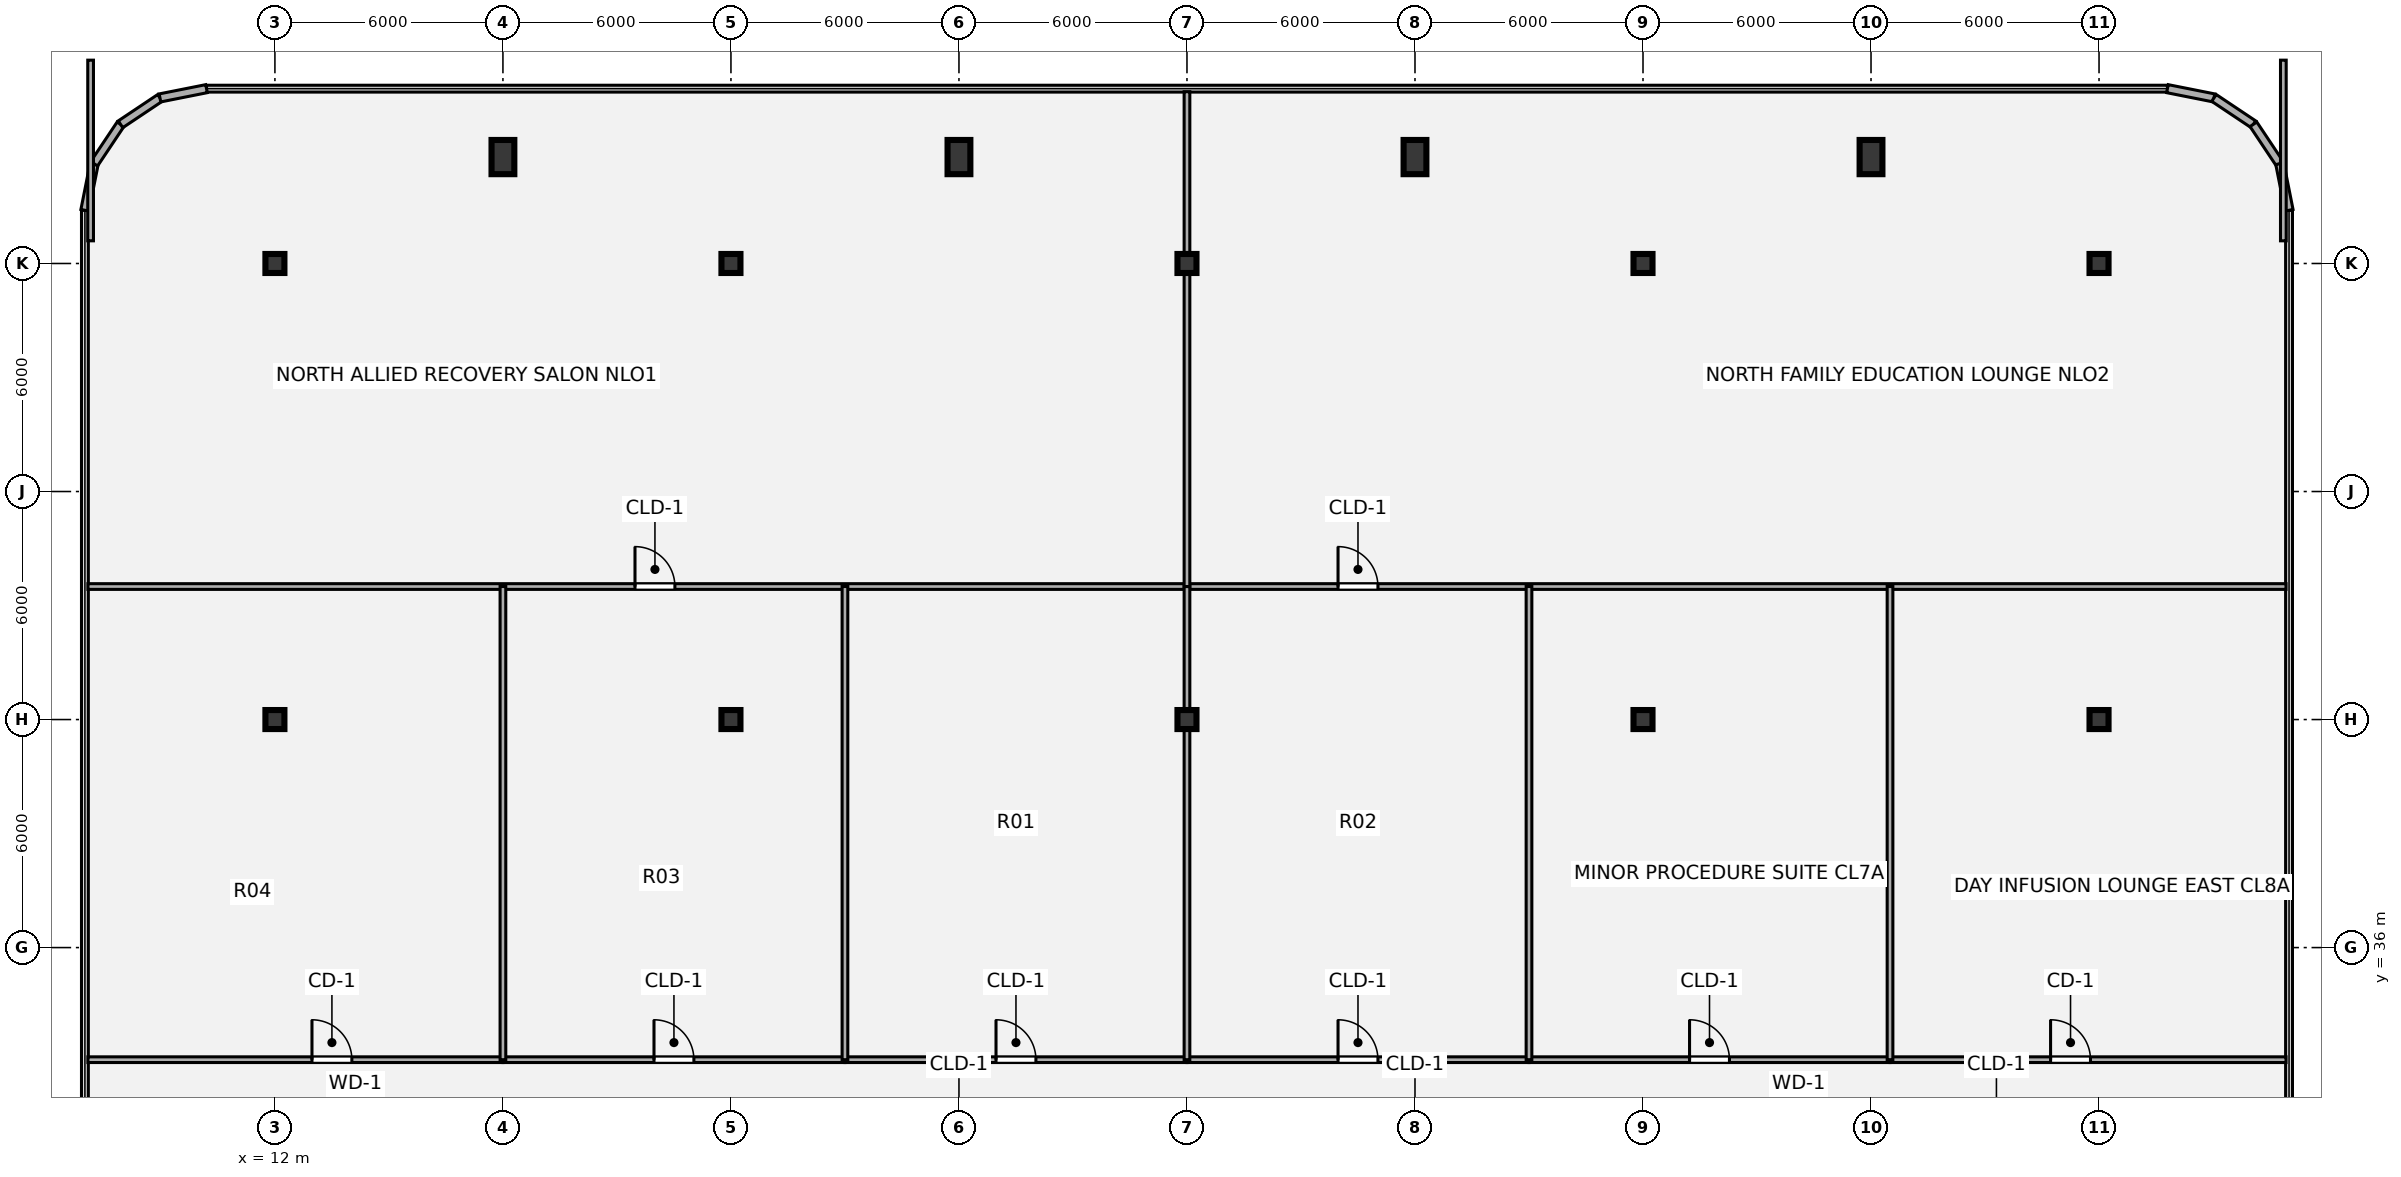
"""IFC4 building model, lengths in metres.
Left out: names, types, materials, properties, quantities, classifications, styles, units other than length and angle.
Written with IfcOpenShell. Run it as: python <this file> out.ifc"""

import sys

from ifc_helpers import new_model, si_unit, direction, frame, frame_2d, origin, origin_2d, place, context, subcontext, project, spatial, rectangle, i_section, extrude, source, transform, mapped, element, fill, save


model = new_model("IFC4")
c1 = context("Model", 3, precision=1e-05, world=origin(), true_north=direction((0.0, 1.0)))
c2 = subcontext(c1, "Body", "Model", "MODEL_VIEW")
j1 = project(units=[si_unit("LENGTHUNIT", "METRE"), si_unit("PLANEANGLEUNIT", "RADIAN")], contexts=[c1])
p1 = place(None, origin())
s1 = spatial("IfcSite", under=j1, at=p1, CompositionType="ELEMENT")
p2 = place(p1, origin())
s2 = spatial("IfcBuilding", under=s1, at=p2, CompositionType="ELEMENT")
p3 = place(p2, frame((0.0, 0.0, 9.72)))
s3 = spatial("IfcBuildingStorey", under=s2, at=p3, CompositionType="ELEMENT", Elevation=9.72)
m1 = source(origin(), c2, "Body", "SweptSolid", [
    extrude(i_section(OverallWidth=0.5, OverallDepth=0.5, WebThickness=0.022, FlangeThickness=0.035, at=origin_2d()), origin(), (0.0, 0.0, 1.0), 4.32),
])
for number, where, z_axis, x_axis in (
    (1, (12.0, 42.0, 0.0), (0.0, 0.0, 1.0), (1.0, 0.0, 0.0)),
    (2, (24.0, 42.0, 0.0), (0.0, 0.0, 1.0), (1.0, 0.0, 0.0)),
    (3, (36.0, 42.0, 0.0), (0.0, 0.0, 1.0), (1.0, 0.0, 0.0)),
    (4, (48.0, 42.0, 0.0), (0.0, 0.0, 1.0), (1.0, 0.0, 0.0)),
    (5, (60.0, 42.0, 0.0), (0.0, 0.0, 1.0), (1.0, 0.0, 0.0)),
    (6, (12.0, 54.0, 0.0), (0.0, 0.0, 1.0), (1.0, 0.0, 0.0)),
    (7, (24.0, 54.0, 0.0), (0.0, 0.0, 1.0), (1.0, 0.0, 0.0)),
    (8, (36.0, 54.0, 0.0), (0.0, 0.0, 1.0), (1.0, 0.0, 0.0)),
    (9, (48.0, 54.0, 0.0), (0.0, 0.0, 1.0), (1.0, 0.0, 0.0)),
    (10, (60.0, 54.0, 0.0), (0.0, 0.0, 1.0), (1.0, 0.0, 0.0)),
):
    element("IfcColumn", number, at=place(p3, frame(where, z_axis=z_axis, x_axis=x_axis)), inside=s3, PredefinedType="COLUMN", context=c2, shape_type="MappedRepresentation", body=[
        mapped(m1, transform((0.0, 0.0, 0.0), x_axis=(1.0, 0.0, 0.0), y_axis=(0.0, 1.0, 0.0), z_axis=(0.0, 0.0, 1.0), scale=1.0)),
    ])
m2 = source(origin(), c2, "Body", "SweptSolid", [
    extrude(rectangle(XDim=0.6, YDim=0.9, at=origin_2d()), origin(), (0.0, 0.0, 1.0), 4.32),
])
for number, where, z_axis, x_axis in (
    (11, (18.0, 56.8, 0.0), (0.0, 0.0, 1.0), (1.0, 0.0, 0.0)),
    (12, (30.0, 56.8, 0.0), (0.0, 0.0, 1.0), (1.0, 0.0, 0.0)),
    (13, (42.0, 56.8, 0.0), (0.0, 0.0, 1.0), (1.0, 0.0, 0.0)),
    (14, (54.0, 56.8, 0.0), (0.0, 0.0, 1.0), (1.0, 0.0, 0.0)),
):
    element("IfcColumn", number, at=place(p3, frame(where, z_axis=z_axis, x_axis=x_axis)), inside=s3, PredefinedType="PILASTER", context=c2, shape_type="MappedRepresentation", body=[
        mapped(m2, transform((0.0, 0.0, 0.0), x_axis=(1.0, 0.0, 0.0), y_axis=(0.0, 1.0, 0.0), z_axis=(0.0, 0.0, 1.0), scale=1.0)),
    ])
for number, where, z_axis, x_axis in (
    (15, (7.0, 55.4, 0.0), (0.0, 0.0, 1.0), (0.195, 0.981, 0.0)),
    (16, (7.244, 56.625, 0.0), (0.0, 0.0, 1.0), (0.556, 0.831, 0.0)),
    (17, (7.937, 57.663, 0.0), (0.0, 0.0, 1.0), (0.831, 0.556, 0.0)),
    (18, (8.975, 58.356, 0.0), (0.0, 0.0, 1.0), (0.981, 0.195, 0.0)),
    (19, (61.8, 58.6, 0.0), (0.0, 0.0, 1.0), (0.981, -0.195, 0.0)),
    (20, (63.025, 58.356, 0.0), (0.0, 0.0, 1.0), (0.831, -0.556, 0.0)),
    (21, (64.063, 57.663, 0.0), (0.0, 0.0, 1.0), (0.556, -0.831, 0.0)),
    (22, (64.756, 56.625, 0.0), (0.0, 0.0, 1.0), (0.195, -0.981, 0.0)),
):
    element("IfcWall", number, at=place(p3, frame(where, z_axis=z_axis, x_axis=x_axis)), inside=s3, PredefinedType="SOLIDWALL", context=c2, shape_type="SweptSolid", body=[
        extrude(rectangle(XDim=1.249, YDim=0.215, at=frame_2d((0.624, 0.0))), origin(), (0.0, 0.0, 1.0), 4.04),
    ])
p4 = place(p3, frame((7.08, 33.05, 0.0), z_axis=(0.0, 0.0, 1.0), x_axis=(1.0, 0.0, 0.0)))
e23 = element("IfcWall", 23, at=p4, inside=s3, PredefinedType="PARTITIONING", context=c2, shape_type="SweptSolid", body=[
    extrude(rectangle(XDim=10.92, YDim=0.15, at=frame_2d((5.46, 0.0))), origin(), (0.0, 0.0, 1.0), 4.01),
])
p5 = place(p4, frame((5.895, 0.0, 0.0)))
e24 = element("IfcOpeningElement", 24, at=p5, cuts=e23, PredefinedType="OPENING", context=c2, shape_type="SweptSolid", body=[
    extrude(rectangle(XDim=1.05, YDim=2.1, at=origin_2d()), frame((0.525, 0.085, 1.05), z_axis=(0.0, -1.0, 0.0), x_axis=(1.0, 0.0, 0.0)), (0.0, 0.0, 1.0), 0.17),
])
p6 = place(p3, frame((18.0, 33.05, 0.0), z_axis=(0.0, 0.0, 1.0), x_axis=(1.0, 0.0, 0.0)))
e25 = element("IfcWall", 25, at=p6, inside=s3, PredefinedType="PARTITIONING", context=c2, shape_type="SweptSolid", body=[
    extrude(rectangle(XDim=9.0, YDim=0.15, at=frame_2d((4.5, 0.0))), origin(), (0.0, 0.0, 1.0), 4.01),
])
p7 = place(p6, frame((3.975, 0.0, 0.0)))
e26 = element("IfcOpeningElement", 26, at=p7, cuts=e25, PredefinedType="OPENING", context=c2, shape_type="SweptSolid", body=[
    extrude(rectangle(XDim=1.05, YDim=2.1, at=origin_2d()), frame((0.525, 0.085, 1.05), z_axis=(0.0, -1.0, 0.0), x_axis=(1.0, 0.0, 0.0)), (0.0, 0.0, 1.0), 0.17),
])
p8 = place(p3, frame((27.0, 33.05, 0.0), z_axis=(0.0, 0.0, 1.0), x_axis=(1.0, 0.0, 0.0)))
e27 = element("IfcWall", 27, at=p8, inside=s3, PredefinedType="PARTITIONING", context=c2, shape_type="SweptSolid", body=[
    extrude(rectangle(XDim=9.0, YDim=0.15, at=frame_2d((4.5, 0.0))), origin(), (0.0, 0.0, 1.0), 4.01),
])
p9 = place(p8, frame((3.975, 0.0, 0.0)))
e28 = element("IfcOpeningElement", 28, at=p9, cuts=e27, PredefinedType="OPENING", context=c2, shape_type="SweptSolid", body=[
    extrude(rectangle(XDim=1.05, YDim=2.1, at=origin_2d()), frame((0.525, 0.085, 1.05), z_axis=(0.0, -1.0, 0.0), x_axis=(1.0, 0.0, 0.0)), (0.0, 0.0, 1.0), 0.17),
])
p10 = place(p3, frame((36.0, 33.05, 0.0), z_axis=(0.0, 0.0, 1.0), x_axis=(1.0, 0.0, 0.0)))
e29 = element("IfcWall", 29, at=p10, inside=s3, PredefinedType="PARTITIONING", context=c2, shape_type="SweptSolid", body=[
    extrude(rectangle(XDim=9.0, YDim=0.15, at=frame_2d((4.5, 0.0))), origin(), (0.0, 0.0, 1.0), 4.01),
])
p11 = place(p10, frame((3.975, 0.0, 0.0)))
e30 = element("IfcOpeningElement", 30, at=p11, cuts=e29, PredefinedType="OPENING", context=c2, shape_type="SweptSolid", body=[
    extrude(rectangle(XDim=1.05, YDim=2.1, at=origin_2d()), frame((0.525, 0.085, 1.05), z_axis=(0.0, -1.0, 0.0), x_axis=(1.0, 0.0, 0.0)), (0.0, 0.0, 1.0), 0.17),
])
p12 = place(p3, frame((45.0, 33.05, 0.0), z_axis=(0.0, 0.0, 1.0), x_axis=(1.0, 0.0, 0.0)))
e31 = element("IfcWall", 31, at=p12, inside=s3, PredefinedType="PARTITIONING", context=c2, shape_type="SweptSolid", body=[
    extrude(rectangle(XDim=9.5, YDim=0.15, at=frame_2d((4.75, 0.0))), origin(), (0.0, 0.0, 1.0), 4.01),
])
p13 = place(p12, frame((4.225, 0.0, 0.0)))
e32 = element("IfcOpeningElement", 32, at=p13, cuts=e31, PredefinedType="OPENING", context=c2, shape_type="SweptSolid", body=[
    extrude(rectangle(XDim=1.05, YDim=2.1, at=origin_2d()), frame((0.525, 0.085, 1.05), z_axis=(0.0, -1.0, 0.0), x_axis=(1.0, 0.0, 0.0)), (0.0, 0.0, 1.0), 0.17),
])
p14 = place(p3, frame((54.5, 33.05, 0.0), z_axis=(0.0, 0.0, 1.0), x_axis=(1.0, 0.0, 0.0)))
e33 = element("IfcWall", 33, at=p14, inside=s3, PredefinedType="PARTITIONING", context=c2, shape_type="SweptSolid", body=[
    extrude(rectangle(XDim=10.42, YDim=0.15, at=frame_2d((5.21, 0.0))), origin(), (0.0, 0.0, 1.0), 4.01),
])
p15 = place(p14, frame((4.225, 0.0, 0.0)))
e34 = element("IfcOpeningElement", 34, at=p15, cuts=e33, PredefinedType="OPENING", context=c2, shape_type="SweptSolid", body=[
    extrude(rectangle(XDim=1.05, YDim=2.1, at=origin_2d()), frame((0.525, 0.085, 1.05), z_axis=(0.0, -1.0, 0.0), x_axis=(1.0, 0.0, 0.0)), (0.0, 0.0, 1.0), 0.17),
])
p16 = place(p3, frame((7.08, 45.5, 0.0), z_axis=(0.0, 0.0, 1.0), x_axis=(1.0, 0.0, 0.0)))
e35 = element("IfcWall", 35, at=p16, inside=s3, PredefinedType="PARTITIONING", context=c2, shape_type="SweptSolid", body=[
    extrude(rectangle(XDim=28.92, YDim=0.15, at=frame_2d((14.46, 0.0))), origin(), (0.0, 0.0, 1.0), 4.01),
])
p17 = place(p16, frame((14.395, 0.0, 0.0)))
e36 = element("IfcOpeningElement", 36, at=p17, cuts=e35, PredefinedType="OPENING", context=c2, shape_type="SweptSolid", body=[
    extrude(rectangle(XDim=1.05, YDim=2.1, at=origin_2d()), frame((0.525, 0.085, 1.05), z_axis=(0.0, -1.0, 0.0), x_axis=(1.0, 0.0, 0.0)), (0.0, 0.0, 1.0), 0.17),
])
p18 = place(p3, frame((36.0, 45.5, 0.0), z_axis=(0.0, 0.0, 1.0), x_axis=(1.0, 0.0, 0.0)))
e37 = element("IfcWall", 37, at=p18, inside=s3, PredefinedType="PARTITIONING", context=c2, shape_type="SweptSolid", body=[
    extrude(rectangle(XDim=28.92, YDim=0.15, at=frame_2d((14.46, 0.0))), origin(), (0.0, 0.0, 1.0), 4.01),
])
p19 = place(p18, frame((3.975, 0.0, 0.0)))
e38 = element("IfcOpeningElement", 38, at=p19, cuts=e37, PredefinedType="OPENING", context=c2, shape_type="SweptSolid", body=[
    extrude(rectangle(XDim=1.05, YDim=2.1, at=origin_2d()), frame((0.525, 0.085, 1.05), z_axis=(0.0, -1.0, 0.0), x_axis=(1.0, 0.0, 0.0)), (0.0, 0.0, 1.0), 0.17),
])
p20 = place(p3, frame((7.15, 54.596, 0.0), z_axis=(0.0, 0.0, 1.0), x_axis=(0.0, 1.0, 0.0)))
e39 = element("IfcWall", 39, at=p20, inside=s3, PredefinedType="PARTITIONING", context=c2, shape_type="SweptSolid", body=[
    extrude(rectangle(XDim=4.754, YDim=0.15, at=frame_2d((2.377, 0.0))), origin(), (0.0, 0.0, 1.0), 4.01),
])
for number, where, z_axis, x_axis in (
    (40, (18.0, 33.05, 0.0), (0.0, 0.0, 1.0), (0.0, 1.0, 0.0)),
    (41, (27.0, 33.05, 0.0), (0.0, 0.0, 1.0), (0.0, 1.0, 0.0)),
):
    element("IfcWall", number, at=place(p3, frame(where, z_axis=z_axis, x_axis=x_axis)), inside=s3, PredefinedType="PARTITIONING", context=c2, shape_type="SweptSolid", body=[
        extrude(rectangle(XDim=12.45, YDim=0.15, at=frame_2d((6.225, 0.0))), origin(), (0.0, 0.0, 1.0), 3.666),
    ])
p21 = place(p3, frame((36.0, 33.05, 0.0), z_axis=(0.0, 0.0, 1.0), x_axis=(0.0, 1.0, 0.0)))
e42 = element("IfcWall", 42, at=p21, inside=s3, PredefinedType="PARTITIONING", context=c2, shape_type="SweptSolid", body=[
    extrude(rectangle(XDim=12.45, YDim=0.15, at=frame_2d((6.225, 0.0))), origin(), (0.0, 0.0, 1.0), 3.225),
])
p22 = place(p3, frame((36.0, 45.5, 0.0), z_axis=(0.0, 0.0, 1.0), x_axis=(0.0, 1.0, 0.0)))
e43 = element("IfcWall", 43, at=p22, inside=s3, PredefinedType="PARTITIONING", context=c2, shape_type="SweptSolid", body=[
    extrude(rectangle(XDim=13.02, YDim=0.15, at=frame_2d((6.51, 0.0))), origin(), (0.0, 0.0, 1.0), 3.225),
])
for number, where, z_axis, x_axis in (
    (44, (45.0, 33.05, 0.0), (0.0, 0.0, 1.0), (0.0, 1.0, 0.0)),
    (45, (54.5, 33.05, 0.0), (0.0, 0.0, 1.0), (0.0, 1.0, 0.0)),
):
    element("IfcWall", number, at=place(p3, frame(where, z_axis=z_axis, x_axis=x_axis)), inside=s3, PredefinedType="PARTITIONING", context=c2, shape_type="SweptSolid", body=[
        extrude(rectangle(XDim=12.45, YDim=0.15, at=frame_2d((6.225, 0.0))), origin(), (0.0, 0.0, 1.0), 3.666),
    ])
p23 = place(p3, frame((64.85, 54.596, 0.0), z_axis=(0.0, 0.0, 1.0), x_axis=(0.0, 1.0, 0.0)))
e46 = element("IfcWall", 46, at=p23, inside=s3, PredefinedType="PARTITIONING", context=c2, shape_type="SweptSolid", body=[
    extrude(rectangle(XDim=4.754, YDim=0.15, at=frame_2d((2.377, 0.0))), origin(), (0.0, 0.0, 1.0), 4.01),
])
m3 = source(origin(), c2, "Body", "SweptSolid", [
    extrude(rectangle(XDim=1.05, YDim=2.1, at=origin_2d()), frame((0.525, 0.025, 1.05), z_axis=(0.0, -1.0, 0.0), x_axis=(1.0, 0.0, 0.0)), (0.0, 0.0, 1.0), 0.05),
])
p24 = place(p5, origin())
e47 = element("IfcDoor", 47, at=p24, inside=s3, OperationType="SINGLE_SWING_LEFT", PredefinedType="DOOR", context=c2, shape_type="MappedRepresentation", body=[
    mapped(m3, transform((0.0, 0.0, 0.0), x_axis=(1.0, 0.0, 0.0), y_axis=(0.0, 1.0, 0.0), z_axis=(0.0, 0.0, 1.0), scale=1.0)),
])
fill(e24, e47)
m4 = source(origin(), c2, "Body", "SweptSolid", [
    extrude(rectangle(XDim=1.05, YDim=2.1, at=origin_2d()), frame((0.525, 0.025, 1.05), z_axis=(0.0, -1.0, 0.0), x_axis=(1.0, 0.0, 0.0)), (0.0, 0.0, 1.0), 0.05),
])
p25 = place(p7, origin())
e48 = element("IfcDoor", 48, at=p25, inside=s3, OperationType="SINGLE_SWING_LEFT", PredefinedType="DOOR", context=c2, shape_type="MappedRepresentation", body=[
    mapped(m4, transform((0.0, 0.0, 0.0), x_axis=(1.0, 0.0, 0.0), y_axis=(0.0, 1.0, 0.0), z_axis=(0.0, 0.0, 1.0), scale=1.0)),
])
fill(e26, e48)
p26 = place(p9, origin())
e49 = element("IfcDoor", 49, at=p26, inside=s3, OperationType="SINGLE_SWING_LEFT", PredefinedType="DOOR", context=c2, shape_type="MappedRepresentation", body=[
    mapped(m4, transform((0.0, 0.0, 0.0), x_axis=(1.0, 0.0, 0.0), y_axis=(0.0, 1.0, 0.0), z_axis=(0.0, 0.0, 1.0), scale=1.0)),
])
fill(e28, e49)
p27 = place(p11, origin())
e50 = element("IfcDoor", 50, at=p27, inside=s3, OperationType="SINGLE_SWING_LEFT", PredefinedType="DOOR", context=c2, shape_type="MappedRepresentation", body=[
    mapped(m4, transform((0.0, 0.0, 0.0), x_axis=(1.0, 0.0, 0.0), y_axis=(0.0, 1.0, 0.0), z_axis=(0.0, 0.0, 1.0), scale=1.0)),
])
fill(e30, e50)
p28 = place(p13, origin())
e51 = element("IfcDoor", 51, at=p28, inside=s3, OperationType="SINGLE_SWING_LEFT", PredefinedType="DOOR", context=c2, shape_type="MappedRepresentation", body=[
    mapped(m4, transform((0.0, 0.0, 0.0), x_axis=(1.0, 0.0, 0.0), y_axis=(0.0, 1.0, 0.0), z_axis=(0.0, 0.0, 1.0), scale=1.0)),
])
fill(e32, e51)
p29 = place(p15, origin())
e52 = element("IfcDoor", 52, at=p29, inside=s3, OperationType="SINGLE_SWING_LEFT", PredefinedType="DOOR", context=c2, shape_type="MappedRepresentation", body=[
    mapped(m3, transform((0.0, 0.0, 0.0), x_axis=(1.0, 0.0, 0.0), y_axis=(0.0, 1.0, 0.0), z_axis=(0.0, 0.0, 1.0), scale=1.0)),
])
fill(e34, e52)
p30 = place(p17, origin())
e53 = element("IfcDoor", 53, at=p30, inside=s3, OperationType="SINGLE_SWING_LEFT", PredefinedType="DOOR", context=c2, shape_type="MappedRepresentation", body=[
    mapped(m4, transform((0.0, 0.0, 0.0), x_axis=(1.0, 0.0, 0.0), y_axis=(0.0, 1.0, 0.0), z_axis=(0.0, 0.0, 1.0), scale=1.0)),
])
fill(e36, e53)
p31 = place(p19, origin())
e54 = element("IfcDoor", 54, at=p31, inside=s3, OperationType="SINGLE_SWING_LEFT", PredefinedType="DOOR", context=c2, shape_type="MappedRepresentation", body=[
    mapped(m4, transform((0.0, 0.0, 0.0), x_axis=(1.0, 0.0, 0.0), y_axis=(0.0, 1.0, 0.0), z_axis=(0.0, 0.0, 1.0), scale=1.0)),
])
fill(e38, e54)
save(model, sys.argv[1])
